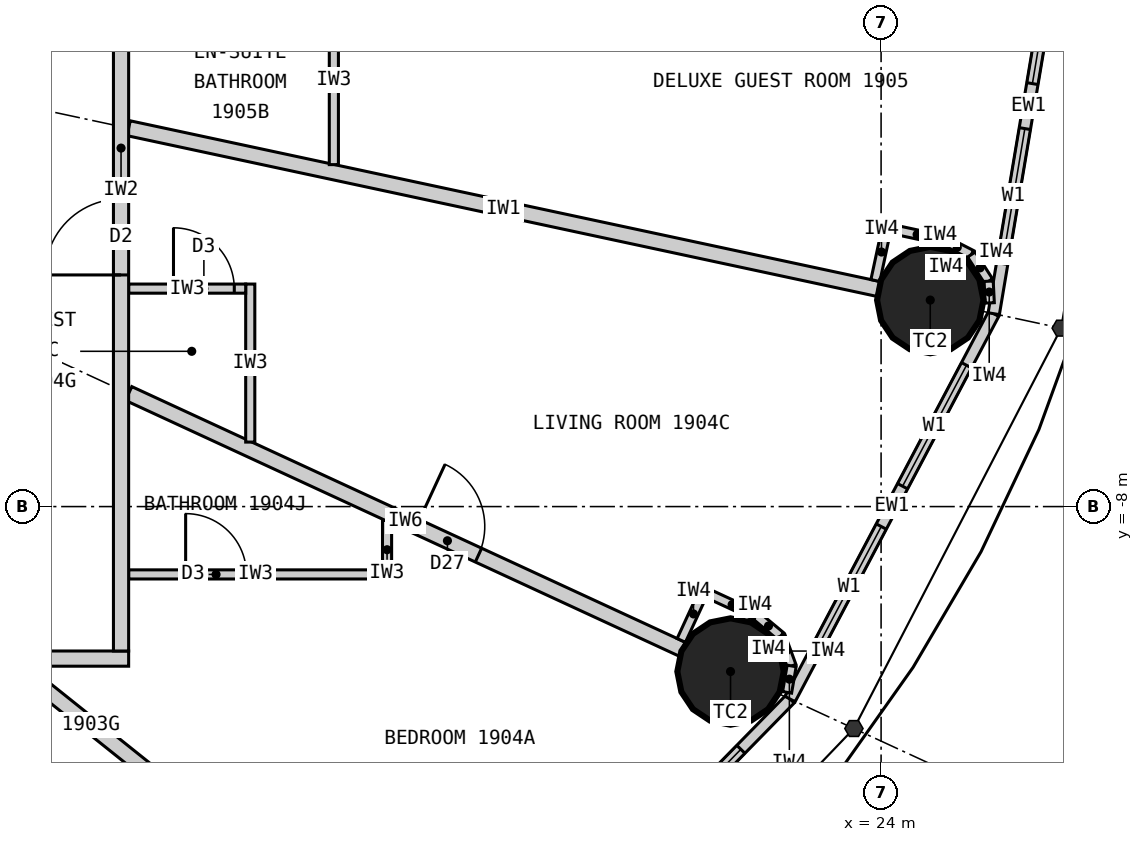
"""IFC4 building model, lengths in metres.
Left out: names, types, materials, properties, quantities, classifications, styles, units other than length and angle.
Written with IfcOpenShell. Run it as: python <this file> out.ifc"""

import sys

from ifc_helpers import new_model, si_unit, direction, frame, frame_2d, origin, origin_2d, place, context, subcontext, project, spatial, rectangle, circle, extrude, element, fill, save


model = new_model("IFC4")
c1 = context("Model", 3, precision=1e-05, world=origin(), true_north=direction((0.0, 1.0)))
c2 = subcontext(c1, "Body", "Model", "MODEL_VIEW")
j1 = project(units=[si_unit("LENGTHUNIT", "METRE"), si_unit("PLANEANGLEUNIT", "RADIAN")], contexts=[c1])
p1 = place(None, origin())
s1 = spatial("IfcSite", under=j1, at=p1, CompositionType="ELEMENT")
p2 = place(p1, origin())
s2 = spatial("IfcBuilding", under=s1, at=p2, CompositionType="ELEMENT")
p3 = place(p2, frame((0.0, 0.0, 77.1)))
s3 = spatial("IfcBuildingStorey", under=s2, at=p3, CompositionType="ELEMENT", Elevation=77.1)
for number, where, z_axis, x_axis in (
    (1, (22.019, -10.17, 0.0), (0.0, 0.0, 1.0), (1.0, 0.0, 0.0)),
    (2, (24.647, -5.283, 0.0), (0.0, 0.0, 1.0), (1.0, 0.0, 0.0)),
):
    element("IfcColumn", number, at=place(p3, frame(where, z_axis=z_axis, x_axis=x_axis)), inside=s3, PredefinedType="COLUMN", context=c2, shape_type="SweptSolid", body=[
        extrude(circle(Radius=0.7, at=origin_2d()), origin(), (0.0, 0.0, 1.0), 3.3),
    ])
p4 = place(p3, frame((18.57, -14.856, 0.0), z_axis=(0.0, 0.0, 1.0), x_axis=(0.699602905915, 0.714531856557, 0.0)))
e3 = element("IfcWall", 3, at=p4, inside=s3, PredefinedType="ELEMENTEDWALL", context=c2, shape_type="SweptSolid", body=[
    extrude(rectangle(XDim=6.051, YDim=0.15, at=frame_2d((3.025, 0.0))), origin(), (0.0, 0.0, 1.0), 3.12),
])
p5 = place(p4, frame((0.926, 0.0, 0.9)))
e4 = element("IfcOpeningElement", 4, at=p5, cuts=e3, PredefinedType="OPENING", context=c2, shape_type="SweptSolid", body=[
    extrude(rectangle(XDim=1.8, YDim=1.9, at=frame_2d((0.9, 0.95))), frame((0.0, 0.085, 0.0), z_axis=(0.0, -1.0, 0.0), x_axis=(1.0, 0.0, 0.0)), (0.0, 0.0, 1.0), 0.17),
])
p6 = place(p4, frame((3.325, 0.0, 0.9)))
e5 = element("IfcOpeningElement", 5, at=p6, cuts=e3, PredefinedType="OPENING", context=c2, shape_type="SweptSolid", body=[
    extrude(rectangle(XDim=1.8, YDim=1.9, at=frame_2d((0.9, 0.95))), frame((0.0, 0.085, 0.0), z_axis=(0.0, -1.0, 0.0), x_axis=(1.0, 0.0, 0.0)), (0.0, 0.0, 1.0), 0.17),
])
p7 = place(p3, frame((22.803, -10.532, 0.0), z_axis=(0.0, 0.0, 1.0), x_axis=(0.467296867008, 0.884100468321, 0.0)))
e6 = element("IfcWall", 6, at=p7, inside=s3, PredefinedType="ELEMENTEDWALL", context=c2, shape_type="SweptSolid", body=[
    extrude(rectangle(XDim=5.734, YDim=0.15, at=frame_2d((2.867, 0.0))), origin(), (0.0, 0.0, 1.0), 3.12),
])
p8 = place(p7, frame((0.767, 0.0, 0.9)))
e7 = element("IfcOpeningElement", 7, at=p8, cuts=e6, PredefinedType="OPENING", context=c2, shape_type="SweptSolid", body=[
    extrude(rectangle(XDim=1.8, YDim=1.9, at=frame_2d((0.9, 0.95))), frame((0.0, 0.085, 0.0), z_axis=(0.0, -1.0, 0.0), x_axis=(1.0, 0.0, 0.0)), (0.0, 0.0, 1.0), 0.17),
])
p9 = place(p7, frame((3.167, 0.0, 0.9)))
e8 = element("IfcOpeningElement", 8, at=p9, cuts=e6, PredefinedType="OPENING", context=c2, shape_type="SweptSolid", body=[
    extrude(rectangle(XDim=1.8, YDim=1.9, at=frame_2d((0.9, 0.95))), frame((0.0, 0.085, 0.0), z_axis=(0.0, -1.0, 0.0), x_axis=(1.0, 0.0, 0.0)), (0.0, 0.0, 1.0), 0.17),
])
p10 = place(p3, frame((25.482, -5.462, 0.0), z_axis=(0.0, 0.0, 1.0), x_axis=(0.165642551694, 0.986185857264, 0.0)))
e9 = element("IfcWall", 9, at=p10, inside=s3, PredefinedType="ELEMENTEDWALL", context=c2, shape_type="SweptSolid", body=[
    extrude(rectangle(XDim=5.539, YDim=0.15, at=frame_2d((2.77, 0.0))), origin(), (0.0, 0.0, 1.0), 3.12),
])
p11 = place(p10, frame((0.669, 0.0, 0.9)))
e10 = element("IfcOpeningElement", 10, at=p11, cuts=e9, PredefinedType="OPENING", context=c2, shape_type="SweptSolid", body=[
    extrude(rectangle(XDim=1.8, YDim=1.9, at=frame_2d((0.9, 0.95))), frame((0.0, 0.085, 0.0), z_axis=(0.0, -1.0, 0.0), x_axis=(1.0, 0.0, 0.0)), (0.0, 0.0, 1.0), 0.17),
])
p12 = place(p10, frame((3.07, 0.0, 0.9)))
e11 = element("IfcOpeningElement", 11, at=p12, cuts=e9, PredefinedType="OPENING", context=c2, shape_type="SweptSolid", body=[
    extrude(rectangle(XDim=1.8, YDim=1.9, at=frame_2d((0.9, 0.95))), frame((0.0, 0.085, 0.0), z_axis=(0.0, -1.0, 0.0), x_axis=(1.0, 0.0, 0.0)), (0.0, 0.0, 1.0), 0.17),
])
p13 = place(p3, frame((14.1, -10.0, 0.0), z_axis=(0.0, 0.0, 1.0), x_axis=(-1.0, 0.0, 0.0)))
e12 = element("IfcWall", 12, at=p13, inside=s3, PredefinedType="PARTITIONING", context=c2, shape_type="SweptSolid", body=[
    extrude(rectangle(XDim=28.2, YDim=0.2, at=frame_2d((14.1, 0.0))), origin(), (0.0, 0.0, 1.0), 3.12),
])
p14 = place(p13, frame((24.165, 0.0, 0.0)))
e13 = element("IfcOpeningElement", 13, at=p14, cuts=e12, PredefinedType="OPENING", context=c2, shape_type="SweptSolid", body=[
    extrude(rectangle(XDim=1.0, YDim=2.2, at=frame_2d((0.5, 1.1))), frame((0.0, 0.11, 0.0), z_axis=(0.0, -1.0, 0.0), x_axis=(1.0, 0.0, 0.0)), (0.0, 0.0, 1.0), 0.22),
])
p15 = place(p13, frame((14.923, 0.0, 0.0)))
e14 = element("IfcOpeningElement", 14, at=p15, cuts=e12, PredefinedType="OPENING", context=c2, shape_type="SweptSolid", body=[
    extrude(rectangle(XDim=1.0, YDim=2.2, at=frame_2d((0.5, 1.1))), frame((0.0, 0.11, 0.0), z_axis=(0.0, -1.0, 0.0), x_axis=(1.0, 0.0, 0.0)), (0.0, 0.0, 1.0), 0.22),
])
p16 = place(p13, frame((3.035, 0.0, 0.0)))
e15 = element("IfcOpeningElement", 15, at=p16, cuts=e12, PredefinedType="OPENING", context=c2, shape_type="SweptSolid", body=[
    extrude(rectangle(XDim=1.0, YDim=2.2, at=frame_2d((0.5, 1.1))), frame((0.0, 0.11, 0.0), z_axis=(0.0, -1.0, 0.0), x_axis=(1.0, 0.0, 0.0)), (0.0, 0.0, 1.0), 0.22),
])
p17 = place(p3, frame((12.625, -10.1, 0.0), z_axis=(0.0, 0.0, 1.0), x_axis=(0.780892451574, -0.624665493744, 0.0)))
e16 = element("IfcWall", 16, at=p17, inside=s3, PredefinedType="PARTITIONING", context=c2, shape_type="SweptSolid", body=[
    extrude(rectangle(XDim=6.045, YDim=0.2, at=frame_2d((3.022, 0.0))), origin(), (0.0, 0.0, 1.0), 2.32),
])
p18 = place(p3, frame((14.1, -6.512, 0.0), z_axis=(0.0, 0.0, 1.0), x_axis=(0.907832871056, -0.419332181247, 0.0)))
e17 = element("IfcWall", 17, at=p18, inside=s3, PredefinedType="PARTITIONING", context=c2, shape_type="SweptSolid", body=[
    extrude(rectangle(XDim=8.023, YDim=0.2, at=frame_2d((4.011, 0.0))), origin(), (0.0, 0.0, 1.0), 2.32),
])
p19 = place(p18, frame((4.17, 0.0, 0.0)))
e18 = element("IfcOpeningElement", 18, at=p19, cuts=e17, PredefinedType="OPENING", context=c2, shape_type="SweptSolid", body=[
    extrude(rectangle(XDim=0.9, YDim=2.1, at=frame_2d((0.45, 1.05))), frame((0.0, 0.11, 0.0), z_axis=(0.0, -1.0, 0.0), x_axis=(1.0, 0.0, 0.0)), (0.0, 0.0, 1.0), 0.22),
])
p20 = place(p3, frame((14.1, -3.022, 0.0), z_axis=(0.0, 0.0, 1.0), x_axis=(0.977790014929, -0.209586943072, 0.0)))
e19 = element("IfcWall", 19, at=p20, inside=s3, PredefinedType="PARTITIONING", context=c2, shape_type="SweptSolid", body=[
    extrude(rectangle(XDim=10.087, YDim=0.2, at=frame_2d((5.043, 0.0))), origin(), (0.0, 0.0, 1.0), 2.32),
])
p21 = place(p3, frame((17.5, -8.183, 0.0), z_axis=(0.0, 0.0, 1.0), x_axis=(0.0, -1.0, 0.0)))
e20 = element("IfcWall", 20, at=p21, inside=s3, PredefinedType="PARTITIONING", context=c2, shape_type="SweptSolid", body=[
    extrude(rectangle(XDim=0.77, YDim=0.12, at=frame_2d((0.385, 0.0))), origin(), (0.0, 0.0, 1.0), 3.12),
])
p22 = place(p3, frame((14.1, -8.893, 0.0), z_axis=(0.0, 0.0, 1.0), x_axis=(1.0, 0.0, 0.0)))
e21 = element("IfcWall", 21, at=p22, inside=s3, PredefinedType="PARTITIONING", context=c2, shape_type="SweptSolid", body=[
    extrude(rectangle(XDim=3.34, YDim=0.12, at=frame_2d((1.67, 0.0))), origin(), (0.0, 0.0, 1.0), 3.12),
])
p23 = place(p22, frame((0.75, 0.0, 0.0)))
e22 = element("IfcOpeningElement", 22, at=p23, cuts=e21, PredefinedType="OPENING", context=c2, shape_type="SweptSolid", body=[
    extrude(rectangle(XDim=0.8, YDim=2.1, at=frame_2d((0.4, 1.05))), frame((0.0, 0.07, 0.0), z_axis=(0.0, -1.0, 0.0), x_axis=(1.0, 0.0, 0.0)), (0.0, 0.0, 1.0), 0.14),
])
p24 = place(p3, frame((15.7, -7.152, 0.0), z_axis=(0.0, 0.0, 1.0), x_axis=(0.0, 1.0, 0.0)))
e23 = element("IfcWall", 23, at=p24, inside=s3, PredefinedType="PARTITIONING", context=c2, shape_type="SweptSolid", body=[
    extrude(rectangle(XDim=2.079, YDim=0.12, at=frame_2d((1.04, 0.0))), origin(), (0.0, 0.0, 1.0), 3.12),
])
p25 = place(p3, frame((14.1, -5.133, 0.0), z_axis=(0.0, 0.0, 1.0), x_axis=(1.0, 0.0, 0.0)))
e24 = element("IfcWall", 24, at=p25, inside=s3, PredefinedType="PARTITIONING", context=c2, shape_type="SweptSolid", body=[
    extrude(rectangle(XDim=1.54, YDim=0.12, at=frame_2d((0.77, 0.0))), origin(), (0.0, 0.0, 1.0), 3.12),
])
p26 = place(p25, frame((0.59, 0.0, 0.0)))
e25 = element("IfcOpeningElement", 25, at=p26, cuts=e24, PredefinedType="OPENING", context=c2, shape_type="SweptSolid", body=[
    extrude(rectangle(XDim=0.8, YDim=2.1, at=frame_2d((0.4, 1.05))), frame((0.0, 0.07, 0.0), z_axis=(0.0, -1.0, 0.0), x_axis=(1.0, 0.0, 0.0)), (0.0, 0.0, 1.0), 0.14),
])
p27 = place(p3, frame((16.8, -3.501, 0.0), z_axis=(0.0, 0.0, 1.0), x_axis=(0.0, 1.0, 0.0)))
e26 = element("IfcWall", 26, at=p27, inside=s3, PredefinedType="PARTITIONING", context=c2, shape_type="SweptSolid", body=[
    extrude(rectangle(XDim=2.219, YDim=0.12, at=frame_2d((1.109, 0.0))), origin(), (0.0, 0.0, 1.0), 3.12),
])
p28 = place(p3, frame((14.0, -9.9, 0.0), z_axis=(0.0, 0.0, 1.0), x_axis=(0.0, 1.0, 0.0)))
e27 = element("IfcWall", 27, at=p28, inside=s3, PredefinedType="PARTITIONING", context=c2, shape_type="SweptSolid", body=[
    extrude(rectangle(XDim=13.232, YDim=0.2, at=frame_2d((6.616, 0.0))), origin(), (0.0, 0.0, 1.0), 3.12),
])
p29 = place(p28, frame((4.948, 0.0, 0.0)))
e28 = element("IfcOpeningElement", 28, at=p29, cuts=e27, PredefinedType="OPENING", context=c2, shape_type="SweptSolid", body=[
    extrude(rectangle(XDim=1.0, YDim=2.2, at=frame_2d((0.5, 1.1))), frame((0.0, 0.11, 0.0), z_axis=(0.0, -1.0, 0.0), x_axis=(1.0, 0.0, 0.0)), (0.0, 0.0, 1.0), 0.22),
])
p30 = place(p28, frame((8.718, 0.0, 0.0)))
e29 = element("IfcOpeningElement", 29, at=p30, cuts=e27, PredefinedType="OPENING", context=c2, shape_type="SweptSolid", body=[
    extrude(rectangle(XDim=1.0, YDim=2.2, at=frame_2d((0.5, 1.1))), frame((0.0, 0.11, 0.0), z_axis=(0.0, -1.0, 0.0), x_axis=(1.0, 0.0, 0.0)), (0.0, 0.0, 1.0), 0.22),
])
p31 = place(p28, frame((11.74, 0.0, 0.0)))
e30 = element("IfcOpeningElement", 30, at=p31, cuts=e27, PredefinedType="OPENING", context=c2, shape_type="SweptSolid", body=[
    extrude(rectangle(XDim=1.0, YDim=2.2, at=frame_2d((0.5, 1.1))), frame((0.0, 0.11, 0.0), z_axis=(0.0, -1.0, 0.0), x_axis=(1.0, 0.0, 0.0)), (0.0, 0.0, 1.0), 0.22),
])
p32 = place(p3, frame((21.371, -9.761, 0.0), z_axis=(0.0, 0.0, 1.0), x_axis=(0.419259891039, 0.907866258744, 0.0)))
e31 = element("IfcWall", 31, at=p32, inside=s3, PredefinedType="PARTITIONING", context=c2, shape_type="SweptSolid", body=[
    extrude(rectangle(XDim=0.768, YDim=0.12, at=frame_2d((0.384, 0.0))), origin(), (0.0, 0.0, 1.0), 3.12),
])
p33 = place(p3, frame((21.722, -9.144, 0.0), z_axis=(0.0, 0.0, 1.0), x_axis=(0.907877701396, -0.419235112208, 0.0)))
e32 = element("IfcWall", 32, at=p33, inside=s3, PredefinedType="PARTITIONING", context=c2, shape_type="SweptSolid", body=[
    extrude(rectangle(XDim=0.7, YDim=0.12, at=frame_2d((0.35, 0.0))), origin(), (0.0, 0.0, 1.0), 3.12),
])
p34 = place(p3, frame((22.358, -9.437, 0.0), z_axis=(0.0, 0.0, 1.0), x_axis=(0.768412687942, -0.639954639806, 0.0)))
e33 = element("IfcWall", 33, at=p34, inside=s3, PredefinedType="PARTITIONING", context=c2, shape_type="SweptSolid", body=[
    extrude(rectangle(XDim=0.418, YDim=0.12, at=frame_2d((0.209, 0.0))), origin(), (0.0, 0.0, 1.0), 3.12),
])
p35 = place(p3, frame((22.679, -9.705, 0.0), z_axis=(0.0, 0.0, 1.0), x_axis=(0.345164001646, -0.938542386879, 0.0)))
e34 = element("IfcWall", 34, at=p35, inside=s3, PredefinedType="PARTITIONING", context=c2, shape_type="SweptSolid", body=[
    extrude(rectangle(XDim=0.418, YDim=0.12, at=frame_2d((0.209, 0.0))), origin(), (0.0, 0.0, 1.0), 3.12),
])
p36 = place(p3, frame((22.823, -10.097, 0.0), z_axis=(0.0, 0.0, 1.0), x_axis=(-0.169674995186, -0.985500074079, 0.0)))
e35 = element("IfcWall", 35, at=p36, inside=s3, PredefinedType="PARTITIONING", context=c2, shape_type="SweptSolid", body=[
    extrude(rectangle(XDim=0.353, YDim=0.12, at=frame_2d((0.176, 0.0))), origin(), (0.0, 0.0, 1.0), 3.12),
])
p37 = place(p3, frame((23.925, -5.026, 0.0), z_axis=(0.0, 0.0, 1.0), x_axis=(0.209681192172, 0.977769808109, 0.0)))
e36 = element("IfcWall", 36, at=p37, inside=s3, PredefinedType="PARTITIONING", context=c2, shape_type="SweptSolid", body=[
    extrude(rectangle(XDim=0.767, YDim=0.12, at=frame_2d((0.384, 0.0))), origin(), (0.0, 0.0, 1.0), 3.12),
])
p38 = place(p3, frame((24.132, -4.347, 0.0), z_axis=(0.0, 0.0, 1.0), x_axis=(0.977776882509, -0.209648200638, 0.0)))
e37 = element("IfcWall", 37, at=p38, inside=s3, PredefinedType="PARTITIONING", context=c2, shape_type="SweptSolid", body=[
    extrude(rectangle(XDim=0.7, YDim=0.12, at=frame_2d((0.35, 0.0))), origin(), (0.0, 0.0, 1.0), 3.12),
])
for number, where, z_axis, x_axis in (
    (38, (24.816, -4.494, 0.0), (0.0, 0.0, 1.0), (0.89, -0.455, 0.0)),
    (39, (25.188, -4.684, 0.0), (0.0, 0.0, 1.0), (0.543, -0.84, 0.0)),
):
    element("IfcWall", number, at=place(p3, frame(where, z_axis=z_axis, x_axis=x_axis)), inside=s3, PredefinedType="PARTITIONING", context=c2, shape_type="SweptSolid", body=[
        extrude(rectangle(XDim=0.418, YDim=0.12, at=frame_2d((0.209, 0.0))), origin(), (0.0, 0.0, 1.0), 3.12),
    ])
p39 = place(p3, frame((25.416, -5.035, 0.0), z_axis=(0.0, 0.0, 1.0), x_axis=(0.050406329159, -0.998728793007, 0.0)))
e40 = element("IfcWall", 40, at=p39, inside=s3, PredefinedType="PARTITIONING", context=c2, shape_type="SweptSolid", body=[
    extrude(rectangle(XDim=0.286, YDim=0.12, at=frame_2d((0.143, 0.0))), origin(), (0.0, 0.0, 1.0), 3.12),
])
p40 = place(p6, origin())
e41 = element("IfcWindow", 41, at=p40, inside=s3, PartitioningType="SINGLE_PANEL", PredefinedType="WINDOW", context=c2, shape_type="SweptSolid", body=[
    extrude(rectangle(XDim=1.8, YDim=1.9, at=frame_2d((0.9, 0.95))), frame((0.0, 0.03, 0.0), z_axis=(0.0, -1.0, 0.0), x_axis=(1.0, 0.0, 0.0)), (0.0, 0.0, 1.0), 0.06),
])
fill(e5, e41)
p41 = place(p8, origin())
e42 = element("IfcWindow", 42, at=p41, inside=s3, PartitioningType="SINGLE_PANEL", PredefinedType="WINDOW", context=c2, shape_type="SweptSolid", body=[
    extrude(rectangle(XDim=1.8, YDim=1.9, at=frame_2d((0.9, 0.95))), frame((0.0, 0.03, 0.0), z_axis=(0.0, -1.0, 0.0), x_axis=(1.0, 0.0, 0.0)), (0.0, 0.0, 1.0), 0.06),
])
fill(e7, e42)
p42 = place(p9, origin())
e43 = element("IfcWindow", 43, at=p42, inside=s3, PartitioningType="SINGLE_PANEL", PredefinedType="WINDOW", context=c2, shape_type="SweptSolid", body=[
    extrude(rectangle(XDim=1.8, YDim=1.9, at=frame_2d((0.9, 0.95))), frame((0.0, 0.03, 0.0), z_axis=(0.0, -1.0, 0.0), x_axis=(1.0, 0.0, 0.0)), (0.0, 0.0, 1.0), 0.06),
])
fill(e8, e43)
p43 = place(p11, origin())
e44 = element("IfcWindow", 44, at=p43, inside=s3, PartitioningType="SINGLE_PANEL", PredefinedType="WINDOW", context=c2, shape_type="SweptSolid", body=[
    extrude(rectangle(XDim=1.8, YDim=1.9, at=frame_2d((0.9, 0.95))), frame((0.0, 0.03, 0.0), z_axis=(0.0, -1.0, 0.0), x_axis=(1.0, 0.0, 0.0)), (0.0, 0.0, 1.0), 0.06),
])
fill(e10, e44)
p44 = place(p12, origin())
e45 = element("IfcWindow", 45, at=p44, inside=s3, PartitioningType="SINGLE_PANEL", PredefinedType="WINDOW", context=c2, shape_type="SweptSolid", body=[
    extrude(rectangle(XDim=1.8, YDim=1.9, at=frame_2d((0.9, 0.95))), frame((0.0, 0.03, 0.0), z_axis=(0.0, -1.0, 0.0), x_axis=(1.0, 0.0, 0.0)), (0.0, 0.0, 1.0), 0.06),
])
fill(e11, e45)
p45 = place(p23, origin())
e46 = element("IfcDoor", 46, at=p45, inside=s3, OperationType="SINGLE_SWING_LEFT", PredefinedType="DOOR", context=c2, shape_type="SweptSolid", body=[
    extrude(rectangle(XDim=0.8, YDim=2.1, at=frame_2d((0.4, 1.05))), frame((0.0, 0.025, 0.0), z_axis=(0.0, -1.0, 0.0), x_axis=(1.0, 0.0, 0.0)), (0.0, 0.0, 1.0), 0.05),
])
fill(e22, e46)
p46 = place(p26, origin())
e47 = element("IfcDoor", 47, at=p46, inside=s3, OperationType="SINGLE_SWING_LEFT", PredefinedType="DOOR", context=c2, shape_type="SweptSolid", body=[
    extrude(rectangle(XDim=0.8, YDim=2.1, at=frame_2d((0.4, 1.05))), frame((0.0, 0.025, 0.0), z_axis=(0.0, -1.0, 0.0), x_axis=(1.0, 0.0, 0.0)), (0.0, 0.0, 1.0), 0.05),
])
fill(e25, e47)
p47 = place(p29, origin())
e48 = element("IfcDoor", 48, at=p47, inside=s3, OperationType="SINGLE_SWING_LEFT", PredefinedType="DOOR", context=c2, shape_type="SweptSolid", body=[
    extrude(rectangle(XDim=1.0, YDim=2.2, at=frame_2d((0.5, 1.1))), frame((0.0, 0.025, 0.0), z_axis=(0.0, -1.0, 0.0), x_axis=(1.0, 0.0, 0.0)), (0.0, 0.0, 1.0), 0.05),
])
fill(e28, e48)
p48 = place(p19, origin())
e49 = element("IfcDoor", 49, at=p48, inside=s3, OperationType="SINGLE_SWING_LEFT", PredefinedType="DOOR", context=c2, shape_type="SweptSolid", body=[
    extrude(rectangle(XDim=0.9, YDim=2.1, at=frame_2d((0.45, 1.05))), frame((0.0, 0.025, 0.0), z_axis=(0.0, -1.0, 0.0), x_axis=(1.0, 0.0, 0.0)), (0.0, 0.0, 1.0), 0.05),
])
fill(e18, e49)
save(model, sys.argv[1])
